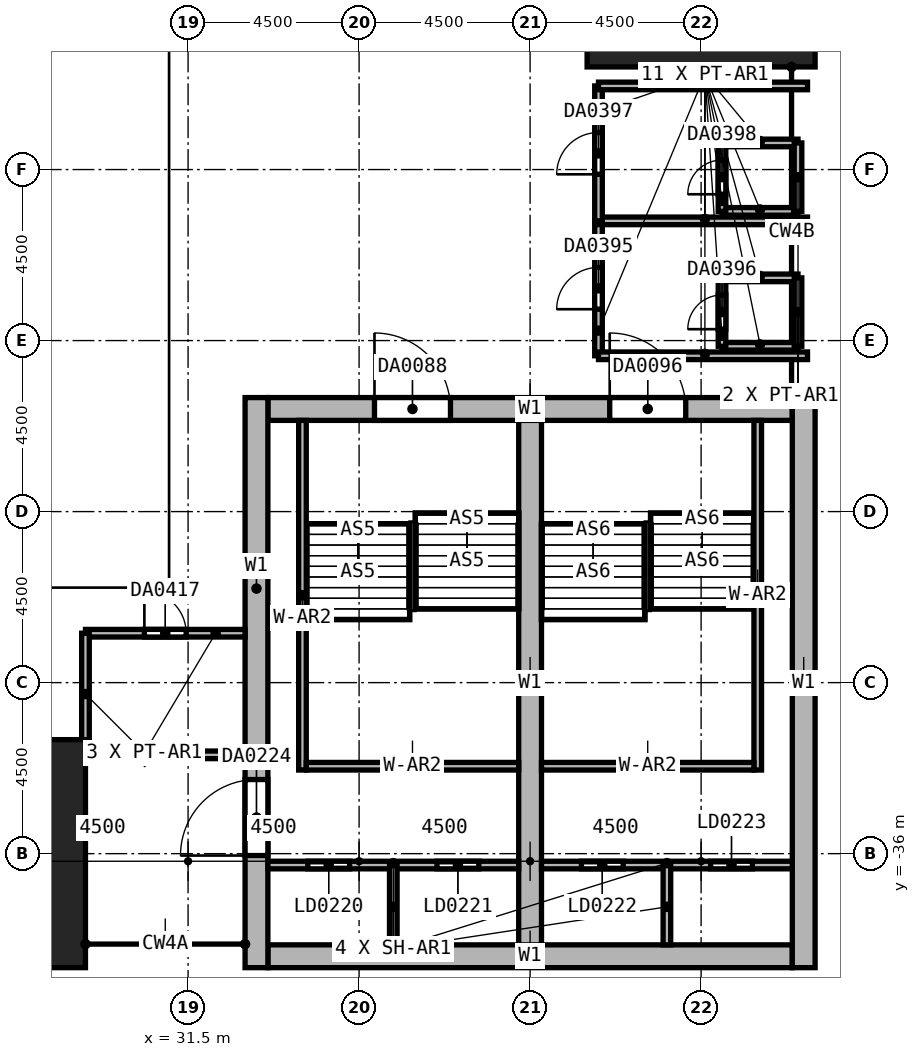
"""IFC4 building model, lengths in metres.
Left out: names, types, materials, properties, quantities, classifications, styles, units other than length and angle.
Written with IfcOpenShell. Run it as: python <this file> out.ifc"""

import sys

from ifc_helpers import new_model, si_unit, direction, frame, frame_2d, origin, origin_2d, place, context, subcontext, project, spatial, rectangle, extrude, element, fill, save


model = new_model("IFC4")
c1 = context("Model", 3, precision=1e-05, world=origin(), true_north=direction((0.0, 1.0)))
c2 = subcontext(c1, "Body", "Model", "MODEL_VIEW")
j1 = project(units=[si_unit("LENGTHUNIT", "METRE"), si_unit("PLANEANGLEUNIT", "RADIAN")], contexts=[c1])
p1 = place(None, origin())
s1 = spatial("IfcSite", under=j1, at=p1, CompositionType="ELEMENT")
p2 = place(p1, origin())
s2 = spatial("IfcBuilding", under=s1, at=p2, CompositionType="ELEMENT")
p3 = place(p2, frame((0.0, 0.0, 25.0)))
s3 = spatial("IfcBuildingStorey", under=s2, at=p3, CompositionType="ELEMENT", Elevation=25.0)
for number, where, z_axis, x_axis in (
    (1, (27.0, -36.0, 0.0), (0.0, 0.0, 1.0), (1.0, 0.0, 0.0)),
    (2, (45.0, -13.5, 0.0), (0.0, 0.0, 1.0), (0.0, 1.0, 0.0)),
):
    element("IfcColumn", number, at=place(p3, frame(where, z_axis=z_axis, x_axis=x_axis)), inside=s3, PredefinedType="COLUMN", context=c2, shape_type="SweptSolid", body=[
        extrude(rectangle(XDim=3.6, YDim=6.0, at=origin_2d()), origin(), (0.0, 0.0, 1.0), 6.0),
    ])
p4 = place(p3, frame((33.6, -24.3, 0.0), z_axis=(0.0, 0.0, 1.0), x_axis=(1.0, 0.0, 0.0)))
e3 = element("IfcWall", 3, at=p4, inside=s3, PredefinedType="SHEAR", context=c2, shape_type="SweptSolid", body=[
    extrude(rectangle(XDim=13.8, YDim=0.6, at=frame_2d((6.9, 0.0))), origin(), (0.0, 0.0, 1.0), 6.0),
])
p5 = place(p4, frame((2.805, 0.0, 0.0)))
e4 = element("IfcOpeningElement", 4, at=p5, cuts=e3, PredefinedType="OPENING", context=c2, shape_type="SweptSolid", body=[
    extrude(rectangle(XDim=2.0, YDim=2.4, at=frame_2d((1.0, 1.2))), frame((0.0, 0.3, 0.0), z_axis=(0.0, -1.0, 0.0), x_axis=(1.0, 0.0, 0.0)), (0.0, 0.0, 1.0), 0.6),
])
p6 = place(p4, frame((8.995, 0.0, 0.0)))
e5 = element("IfcOpeningElement", 5, at=p6, cuts=e3, PredefinedType="OPENING", context=c2, shape_type="SweptSolid", body=[
    extrude(rectangle(XDim=2.0, YDim=2.4, at=frame_2d((1.0, 1.2))), frame((0.0, 0.3, 0.0), z_axis=(0.0, -1.0, 0.0), x_axis=(1.0, 0.0, 0.0)), (0.0, 0.0, 1.0), 0.6),
])
p7 = place(p3, frame((33.6, -38.7, 0.0), z_axis=(0.0, 0.0, 1.0), x_axis=(1.0, 0.0, 0.0)))
e6 = element("IfcWall", 6, at=p7, inside=s3, PredefinedType="SHEAR", context=c2, shape_type="SweptSolid", body=[
    extrude(rectangle(XDim=13.8, YDim=0.6, at=frame_2d((6.9, 0.0))), origin(), (0.0, 0.0, 1.0), 6.0),
])
p8 = place(p3, frame((33.3, -39.0, 0.0), z_axis=(0.0, 0.0, 1.0), x_axis=(0.0, 1.0, 0.0)))
e7 = element("IfcWall", 7, at=p8, inside=s3, PredefinedType="SHEAR", context=c2, shape_type="SweptSolid", body=[
    extrude(rectangle(XDim=15.0, YDim=0.6, at=frame_2d((7.5, 0.0))), origin(), (0.0, 0.0, 1.0), 6.0),
])
p9 = place(p8, frame((2.95, 0.0, 0.0)))
e8 = element("IfcOpeningElement", 8, at=p9, cuts=e7, PredefinedType="OPENING", context=c2, shape_type="SweptSolid", body=[
    extrude(rectangle(XDim=2.0, YDim=2.4, at=frame_2d((1.0, 1.2))), frame((0.0, 0.3, 0.0), z_axis=(0.0, -1.0, 0.0), x_axis=(1.0, 0.0, 0.0)), (0.0, 0.0, 1.0), 0.6),
])
p10 = place(p3, frame((47.7, -39.0, 0.0), z_axis=(0.0, 0.0, 1.0), x_axis=(0.0, 1.0, 0.0)))
e9 = element("IfcWall", 9, at=p10, inside=s3, PredefinedType="SHEAR", context=c2, shape_type="SweptSolid", body=[
    extrude(rectangle(XDim=15.0, YDim=0.6, at=frame_2d((7.5, 0.0))), origin(), (0.0, 0.0, 1.0), 6.0),
])
p11 = place(p3, frame((40.5, -38.4, 0.0), z_axis=(0.0, 0.0, 1.0), x_axis=(0.0, 1.0, 0.0)))
e10 = element("IfcWall", 10, at=p11, inside=s3, PredefinedType="SHEAR", context=c2, shape_type="SweptSolid", body=[
    extrude(rectangle(XDim=13.8, YDim=0.6, at=frame_2d((6.9, 0.0))), origin(), (0.0, 0.0, 1.0), 6.0),
])
p12 = place(p3, frame((34.51, -33.8, 0.0), z_axis=(0.0, 0.0, 1.0), x_axis=(0.0, 1.0, 0.0)))
e11 = element("IfcWall", 11, at=p12, inside=s3, PredefinedType="SOLIDWALL", context=c2, shape_type="SweptSolid", body=[
    extrude(rectangle(XDim=9.2, YDim=0.2, at=frame_2d((4.6, 0.0))), origin(), (0.0, 0.0, 1.0), 6.0),
])
p13 = place(p3, frame((34.61, -33.7, 0.0), z_axis=(0.0, 0.0, 1.0), x_axis=(1.0, 0.0, 0.0)))
e12 = element("IfcWall", 12, at=p13, inside=s3, PredefinedType="SOLIDWALL", context=c2, shape_type="SweptSolid", body=[
    extrude(rectangle(XDim=5.59, YDim=0.2, at=frame_2d((2.795, 0.0))), origin(), (0.0, 0.0, 1.0), 6.0),
])
p14 = place(p3, frame((46.49, -33.8, 0.0), z_axis=(0.0, 0.0, 1.0), x_axis=(0.0, 1.0, 0.0)))
e13 = element("IfcWall", 13, at=p14, inside=s3, PredefinedType="SOLIDWALL", context=c2, shape_type="SweptSolid", body=[
    extrude(rectangle(XDim=9.2, YDim=0.2, at=frame_2d((4.6, 0.0))), origin(), (0.0, 0.0, 1.0), 6.0),
])
p15 = place(p3, frame((40.8, -33.7, 0.0), z_axis=(0.0, 0.0, 1.0), x_axis=(1.0, 0.0, 0.0)))
e14 = element("IfcWall", 14, at=p15, inside=s3, PredefinedType="SOLIDWALL", context=c2, shape_type="SweptSolid", body=[
    extrude(rectangle(XDim=5.59, YDim=0.2, at=frame_2d((2.795, 0.0))), origin(), (0.0, 0.0, 1.0), 6.0),
])
p16 = place(p3, frame((33.6, -36.3, 0.0), z_axis=(0.0, 0.0, 1.0), x_axis=(1.0, 0.0, 0.0)))
e15 = element("IfcWall", 15, at=p16, inside=s3, PredefinedType="SHEAR", context=c2, shape_type="SweptSolid", body=[
    extrude(rectangle(XDim=6.6, YDim=0.2, at=frame_2d((3.3, 0.0))), origin(), (0.0, 0.0, 1.0), 6.0),
])
p17 = place(p16, frame((1.05, 0.0, 0.0)))
e16 = element("IfcOpeningElement", 16, at=p17, cuts=e15, PredefinedType="OPENING", context=c2, shape_type="SweptSolid", body=[
    extrude(rectangle(XDim=1.1, YDim=2.4, at=frame_2d((0.55, 1.2))), frame((0.0, 0.1, 0.0), z_axis=(0.0, -1.0, 0.0), x_axis=(1.0, 0.0, 0.0)), (0.0, 0.0, 1.0), 0.2),
])
p18 = place(p16, frame((4.45, 0.0, 0.0)))
e17 = element("IfcOpeningElement", 17, at=p18, cuts=e15, PredefinedType="OPENING", context=c2, shape_type="SweptSolid", body=[
    extrude(rectangle(XDim=1.1, YDim=2.4, at=frame_2d((0.55, 1.2))), frame((0.0, 0.1, 0.0), z_axis=(0.0, -1.0, 0.0), x_axis=(1.0, 0.0, 0.0)), (0.0, 0.0, 1.0), 0.2),
])
p19 = place(p3, frame((40.8, -36.3, 0.0), z_axis=(0.0, 0.0, 1.0), x_axis=(1.0, 0.0, 0.0)))
e18 = element("IfcWall", 18, at=p19, inside=s3, PredefinedType="SHEAR", context=c2, shape_type="SweptSolid", body=[
    extrude(rectangle(XDim=6.6, YDim=0.2, at=frame_2d((3.3, 0.0))), origin(), (0.0, 0.0, 1.0), 6.0),
])
p20 = place(p19, frame((1.05, 0.0, 0.0)))
e19 = element("IfcOpeningElement", 19, at=p20, cuts=e18, PredefinedType="OPENING", context=c2, shape_type="SweptSolid", body=[
    extrude(rectangle(XDim=1.1, YDim=2.4, at=frame_2d((0.55, 1.2))), frame((0.0, 0.1, 0.0), z_axis=(0.0, -1.0, 0.0), x_axis=(1.0, 0.0, 0.0)), (0.0, 0.0, 1.0), 0.2),
])
p21 = place(p19, frame((4.45, 0.0, 0.0)))
e20 = element("IfcOpeningElement", 20, at=p21, cuts=e18, PredefinedType="OPENING", context=c2, shape_type="SweptSolid", body=[
    extrude(rectangle(XDim=1.1, YDim=2.4, at=frame_2d((0.55, 1.2))), frame((0.0, 0.1, 0.0), z_axis=(0.0, -1.0, 0.0), x_axis=(1.0, 0.0, 0.0)), (0.0, 0.0, 1.0), 0.2),
])
for number, where, z_axis, x_axis in (
    (21, (36.9, -38.4, 0.0), (0.0, 0.0, 1.0), (0.0, 1.0, 0.0)),
    (22, (44.1, -38.4, 0.0), (0.0, 0.0, 1.0), (0.0, 1.0, 0.0)),
):
    element("IfcWall", number, at=place(p3, frame(where, z_axis=z_axis, x_axis=x_axis)), inside=s3, PredefinedType="SHEAR", context=c2, shape_type="SweptSolid", body=[
        extrude(rectangle(XDim=2.1, YDim=0.2, at=frame_2d((1.05, 0.0))), origin(), (0.0, 0.0, 1.0), 6.0),
    ])
p22 = place(p3, frame((42.3, -22.9, 0.0), z_axis=(0.0, 0.0, 1.0), x_axis=(0.0, 1.0, 0.0)))
e23 = element("IfcWall", 23, at=p22, inside=s3, PredefinedType="PARTITIONING", context=c2, shape_type="SweptSolid", body=[
    extrude(rectangle(XDim=3.55, YDim=0.2, at=frame_2d((1.775, 0.0))), origin(), (0.0, 0.0, 1.0), 5.7),
])
p23 = place(p22, frame((1.225, 0.0, 0.0)))
e24 = element("IfcOpeningElement", 24, at=p23, cuts=e23, PredefinedType="OPENING", context=c2, shape_type="SweptSolid", body=[
    extrude(rectangle(XDim=1.1, YDim=2.4, at=frame_2d((0.55, 1.2))), frame((0.0, 0.1, 0.0), z_axis=(0.0, -1.0, 0.0), x_axis=(1.0, 0.0, 0.0)), (0.0, 0.0, 1.0), 0.2),
])
for number, where, z_axis, x_axis in (
    (25, (42.3, -22.9, 0.0), (0.0, 0.0, 1.0), (1.0, 0.0, 0.0)),
    (26, (42.3, -19.35, 0.0), (0.0, 0.0, 1.0), (1.0, 0.0, 0.0)),
):
    element("IfcWall", number, at=place(p3, frame(where, z_axis=z_axis, x_axis=x_axis)), inside=s3, PredefinedType="PARTITIONING", context=c2, shape_type="SweptSolid", body=[
        extrude(rectangle(XDim=5.5, YDim=0.2, at=frame_2d((2.75, 0.0))), origin(), (0.0, 0.0, 1.0), 5.7),
    ])
for number, where, z_axis, x_axis in (
    (27, (45.55, -22.65, 0.0), (0.0, 0.0, 1.0), (1.0, 0.0, 0.0)),
    (28, (47.55, -20.85, 0.0), (0.0, 0.0, 1.0), (-1.0, 0.0, 0.0)),
):
    element("IfcWall", number, at=place(p3, frame(where, z_axis=z_axis, x_axis=x_axis)), inside=s3, PredefinedType="PARTITIONING", context=c2, shape_type="SweptSolid", body=[
        extrude(rectangle(XDim=2.0, YDim=0.2, at=frame_2d((1.0, 0.0))), origin(), (0.0, 0.0, 1.0), 5.7),
    ])
p24 = place(p3, frame((47.55, -22.65, 0.0), z_axis=(0.0, 0.0, 1.0), x_axis=(0.0, 1.0, 0.0)))
e29 = element("IfcWall", 29, at=p24, inside=s3, PredefinedType="PARTITIONING", context=c2, shape_type="SweptSolid", body=[
    extrude(rectangle(XDim=1.8, YDim=0.2, at=frame_2d((0.9, 0.0))), origin(), (0.0, 0.0, 1.0), 4.5),
])
p25 = place(p3, frame((45.55, -22.65, 0.0), z_axis=(0.0, 0.0, 1.0), x_axis=(0.0, 1.0, 0.0)))
e30 = element("IfcWall", 30, at=p25, inside=s3, PredefinedType="PARTITIONING", context=c2, shape_type="SweptSolid", body=[
    extrude(rectangle(XDim=1.8, YDim=0.2, at=frame_2d((0.9, 0.0))), origin(), (0.0, 0.0, 1.0), 5.7),
])
p26 = place(p25, frame((0.45, 0.0, 0.0)))
e31 = element("IfcOpeningElement", 31, at=p26, cuts=e30, PredefinedType="OPENING", context=c2, shape_type="SweptSolid", body=[
    extrude(rectangle(XDim=0.9, YDim=2.1, at=frame_2d((0.45, 1.05))), frame((0.0, 0.1, 0.0), z_axis=(0.0, -1.0, 0.0), x_axis=(1.0, 0.0, 0.0)), (0.0, 0.0, 1.0), 0.2),
])
p27 = place(p3, frame((42.3, -19.35, 0.0), z_axis=(0.0, 0.0, 1.0), x_axis=(0.0, 1.0, 0.0)))
e32 = element("IfcWall", 32, at=p27, inside=s3, PredefinedType="PARTITIONING", context=c2, shape_type="SweptSolid", body=[
    extrude(rectangle(XDim=3.55, YDim=0.2, at=frame_2d((1.775, 0.0))), origin(), (0.0, 0.0, 1.0), 5.7),
])
p28 = place(p27, frame((1.225, 0.0, 0.0)))
e33 = element("IfcOpeningElement", 33, at=p28, cuts=e32, PredefinedType="OPENING", context=c2, shape_type="SweptSolid", body=[
    extrude(rectangle(XDim=1.1, YDim=2.4, at=frame_2d((0.55, 1.2))), frame((0.0, 0.1, 0.0), z_axis=(0.0, -1.0, 0.0), x_axis=(1.0, 0.0, 0.0)), (0.0, 0.0, 1.0), 0.2),
])
p29 = place(p3, frame((42.3, -15.8, 0.0), z_axis=(0.0, 0.0, 1.0), x_axis=(1.0, 0.0, 0.0)))
e34 = element("IfcWall", 34, at=p29, inside=s3, PredefinedType="PARTITIONING", context=c2, shape_type="SweptSolid", body=[
    extrude(rectangle(XDim=5.5, YDim=0.2, at=frame_2d((2.75, 0.0))), origin(), (0.0, 0.0, 1.0), 5.7),
])
for number, where, z_axis, x_axis in (
    (35, (45.55, -19.1, 0.0), (0.0, 0.0, 1.0), (1.0, 0.0, 0.0)),
    (36, (47.55, -17.3, 0.0), (0.0, 0.0, 1.0), (-1.0, 0.0, 0.0)),
):
    element("IfcWall", number, at=place(p3, frame(where, z_axis=z_axis, x_axis=x_axis)), inside=s3, PredefinedType="PARTITIONING", context=c2, shape_type="SweptSolid", body=[
        extrude(rectangle(XDim=2.0, YDim=0.2, at=frame_2d((1.0, 0.0))), origin(), (0.0, 0.0, 1.0), 5.7),
    ])
p30 = place(p3, frame((47.55, -19.1, 0.0), z_axis=(0.0, 0.0, 1.0), x_axis=(0.0, 1.0, 0.0)))
e37 = element("IfcWall", 37, at=p30, inside=s3, PredefinedType="PARTITIONING", context=c2, shape_type="SweptSolid", body=[
    extrude(rectangle(XDim=1.8, YDim=0.2, at=frame_2d((0.9, 0.0))), origin(), (0.0, 0.0, 1.0), 4.5),
])
p31 = place(p3, frame((45.55, -19.1, 0.0), z_axis=(0.0, 0.0, 1.0), x_axis=(0.0, 1.0, 0.0)))
e38 = element("IfcWall", 38, at=p31, inside=s3, PredefinedType="PARTITIONING", context=c2, shape_type="SweptSolid", body=[
    extrude(rectangle(XDim=1.8, YDim=0.2, at=frame_2d((0.9, 0.0))), origin(), (0.0, 0.0, 1.0), 5.7),
])
p32 = place(p31, frame((0.45, 0.0, 0.0)))
e39 = element("IfcOpeningElement", 39, at=p32, cuts=e38, PredefinedType="OPENING", context=c2, shape_type="SweptSolid", body=[
    extrude(rectangle(XDim=0.9, YDim=2.1, at=frame_2d((0.45, 1.05))), frame((0.0, 0.1, 0.0), z_axis=(0.0, -1.0, 0.0), x_axis=(1.0, 0.0, 0.0)), (0.0, 0.0, 1.0), 0.2),
])
p33 = place(p3, frame((28.8, -30.2, 0.0), z_axis=(0.0, 0.0, 1.0), x_axis=(1.0, 0.0, 0.0)))
e40 = element("IfcWall", 40, at=p33, inside=s3, PredefinedType="PARTITIONING", context=c2, shape_type="SweptSolid", body=[
    extrude(rectangle(XDim=4.2, YDim=0.2, at=frame_2d((2.1, 0.0))), origin(), (0.0, 0.0, 1.0), 5.7),
])
p34 = place(p33, frame((1.55, 0.0, 0.0)))
e41 = element("IfcOpeningElement", 41, at=p34, cuts=e40, PredefinedType="OPENING", context=c2, shape_type="SweptSolid", body=[
    extrude(rectangle(XDim=1.1, YDim=2.4, at=frame_2d((0.55, 1.2))), frame((0.0, 0.1, 0.0), z_axis=(0.0, -1.0, 0.0), x_axis=(1.0, 0.0, 0.0)), (0.0, 0.0, 1.0), 0.2),
])
p35 = place(p3, frame((28.8, -33.4, 0.0), z_axis=(0.0, 0.0, 1.0), x_axis=(0.0, 1.0, 0.0)))
e42 = element("IfcWall", 42, at=p35, inside=s3, PredefinedType="PARTITIONING", context=c2, shape_type="SweptSolid", body=[
    extrude(rectangle(XDim=3.2, YDim=0.2, at=frame_2d((1.6, 0.0))), origin(), (0.0, 0.0, 1.0), 5.7),
])
p36 = place(p3, frame((28.8, -33.4, 0.0), z_axis=(0.0, 0.0, 1.0), x_axis=(1.0, 0.0, 0.0)))
e43 = element("IfcWall", 43, at=p36, inside=s3, PredefinedType="PARTITIONING", context=c2, shape_type="SweptSolid", body=[
    extrude(rectangle(XDim=4.2, YDim=0.2, at=frame_2d((2.1, 0.0))), origin(), (0.0, 0.0, 1.0), 5.7),
])
p37 = place(p5, frame((2.0, 0.0, 0.0), z_axis=(0.0, 0.0, 1.0), x_axis=(-1.0, 0.0, 0.0)))
e44 = element("IfcDoor", 44, at=p37, inside=s3, OperationType="DOUBLE_DOOR_SINGLE_SWING", PredefinedType="DOOR", context=c2, shape_type="SweptSolid", body=[
    extrude(rectangle(XDim=2.0, YDim=2.4, at=frame_2d((1.0, 1.2))), frame((0.0, 0.025, 0.0), z_axis=(0.0, -1.0, 0.0), x_axis=(1.0, 0.0, 0.0)), (0.0, 0.0, 1.0), 0.05),
])
fill(e4, e44)
p38 = place(p6, frame((2.0, 0.0, 0.0), z_axis=(0.0, 0.0, 1.0), x_axis=(-1.0, 0.0, 0.0)))
e45 = element("IfcDoor", 45, at=p38, inside=s3, OperationType="DOUBLE_DOOR_SINGLE_SWING", PredefinedType="DOOR", context=c2, shape_type="SweptSolid", body=[
    extrude(rectangle(XDim=2.0, YDim=2.4, at=frame_2d((1.0, 1.2))), frame((0.0, 0.025, 0.0), z_axis=(0.0, -1.0, 0.0), x_axis=(1.0, 0.0, 0.0)), (0.0, 0.0, 1.0), 0.05),
])
fill(e5, e45)
p39 = place(p17, frame((1.1, 0.0, 0.0), z_axis=(0.0, 0.0, 1.0), x_axis=(-1.0, 0.0, 0.0)))
e46 = element("IfcDoor", 46, at=p39, inside=s3, OperationType="DOUBLE_DOOR_SLIDING", PredefinedType="DOOR", context=c2, shape_type="SweptSolid", body=[
    extrude(rectangle(XDim=1.1, YDim=2.4, at=frame_2d((0.55, 1.2))), frame((0.0, 0.025, 0.0), z_axis=(0.0, -1.0, 0.0), x_axis=(1.0, 0.0, 0.0)), (0.0, 0.0, 1.0), 0.05),
])
fill(e16, e46)
p40 = place(p18, frame((1.1, 0.0, 0.0), z_axis=(0.0, 0.0, 1.0), x_axis=(-1.0, 0.0, 0.0)))
e47 = element("IfcDoor", 47, at=p40, inside=s3, OperationType="DOUBLE_DOOR_SLIDING", PredefinedType="DOOR", context=c2, shape_type="SweptSolid", body=[
    extrude(rectangle(XDim=1.1, YDim=2.4, at=frame_2d((0.55, 1.2))), frame((0.0, 0.025, 0.0), z_axis=(0.0, -1.0, 0.0), x_axis=(1.0, 0.0, 0.0)), (0.0, 0.0, 1.0), 0.05),
])
fill(e17, e47)
p41 = place(p20, frame((1.1, 0.0, 0.0), z_axis=(0.0, 0.0, 1.0), x_axis=(-1.0, 0.0, 0.0)))
e48 = element("IfcDoor", 48, at=p41, inside=s3, OperationType="DOUBLE_DOOR_SLIDING", PredefinedType="DOOR", context=c2, shape_type="SweptSolid", body=[
    extrude(rectangle(XDim=1.1, YDim=2.4, at=frame_2d((0.55, 1.2))), frame((0.0, 0.025, 0.0), z_axis=(0.0, -1.0, 0.0), x_axis=(1.0, 0.0, 0.0)), (0.0, 0.0, 1.0), 0.05),
])
fill(e19, e48)
p42 = place(p21, frame((1.1, 0.0, 0.0), z_axis=(0.0, 0.0, 1.0), x_axis=(-1.0, 0.0, 0.0)))
e49 = element("IfcDoor", 49, at=p42, inside=s3, OperationType="DOUBLE_DOOR_SLIDING", PredefinedType="DOOR", context=c2, shape_type="SweptSolid", body=[
    extrude(rectangle(XDim=1.1, YDim=2.4, at=frame_2d((0.55, 1.2))), frame((0.0, 0.025, 0.0), z_axis=(0.0, -1.0, 0.0), x_axis=(1.0, 0.0, 0.0)), (0.0, 0.0, 1.0), 0.05),
])
fill(e20, e49)
p43 = place(p9, origin())
e50 = element("IfcDoor", 50, at=p43, inside=s3, OperationType="DOUBLE_DOOR_SINGLE_SWING", PredefinedType="DOOR", context=c2, shape_type="SweptSolid", body=[
    extrude(rectangle(XDim=2.0, YDim=2.4, at=frame_2d((1.0, 1.2))), frame((0.0, 0.025, 0.0), z_axis=(0.0, -1.0, 0.0), x_axis=(1.0, 0.0, 0.0)), (0.0, 0.0, 1.0), 0.05),
])
fill(e8, e50)
p44 = place(p23, origin())
e51 = element("IfcDoor", 51, at=p44, inside=s3, OperationType="DOUBLE_DOOR_SINGLE_SWING", PredefinedType="DOOR", context=c2, shape_type="SweptSolid", body=[
    extrude(rectangle(XDim=1.1, YDim=2.4, at=frame_2d((0.55, 1.2))), frame((0.0, 0.025, 0.0), z_axis=(0.0, -1.0, 0.0), x_axis=(1.0, 0.0, 0.0)), (0.0, 0.0, 1.0), 0.05),
])
fill(e24, e51)
p45 = place(p26, origin())
e52 = element("IfcDoor", 52, at=p45, inside=s3, OperationType="SINGLE_SWING_LEFT", PredefinedType="DOOR", context=c2, shape_type="SweptSolid", body=[
    extrude(rectangle(XDim=0.9, YDim=2.1, at=frame_2d((0.45, 1.05))), frame((0.0, 0.025, 0.0), z_axis=(0.0, -1.0, 0.0), x_axis=(1.0, 0.0, 0.0)), (0.0, 0.0, 1.0), 0.05),
])
fill(e31, e52)
p46 = place(p28, origin())
e53 = element("IfcDoor", 53, at=p46, inside=s3, OperationType="DOUBLE_DOOR_SINGLE_SWING", PredefinedType="DOOR", context=c2, shape_type="SweptSolid", body=[
    extrude(rectangle(XDim=1.1, YDim=2.4, at=frame_2d((0.55, 1.2))), frame((0.0, 0.025, 0.0), z_axis=(0.0, -1.0, 0.0), x_axis=(1.0, 0.0, 0.0)), (0.0, 0.0, 1.0), 0.05),
])
fill(e33, e53)
p47 = place(p32, origin())
e54 = element("IfcDoor", 54, at=p47, inside=s3, OperationType="SINGLE_SWING_LEFT", PredefinedType="DOOR", context=c2, shape_type="SweptSolid", body=[
    extrude(rectangle(XDim=0.9, YDim=2.1, at=frame_2d((0.45, 1.05))), frame((0.0, 0.025, 0.0), z_axis=(0.0, -1.0, 0.0), x_axis=(1.0, 0.0, 0.0)), (0.0, 0.0, 1.0), 0.05),
])
fill(e39, e54)
p48 = place(p34, origin())
e55 = element("IfcDoor", 55, at=p48, inside=s3, OperationType="DOUBLE_DOOR_SINGLE_SWING", PredefinedType="DOOR", context=c2, shape_type="SweptSolid", body=[
    extrude(rectangle(XDim=1.1, YDim=2.4, at=frame_2d((0.55, 1.2))), frame((0.0, 0.025, 0.0), z_axis=(0.0, -1.0, 0.0), x_axis=(1.0, 0.0, 0.0)), (0.0, 0.0, 1.0), 0.05),
])
fill(e41, e55)
save(model, sys.argv[1])
